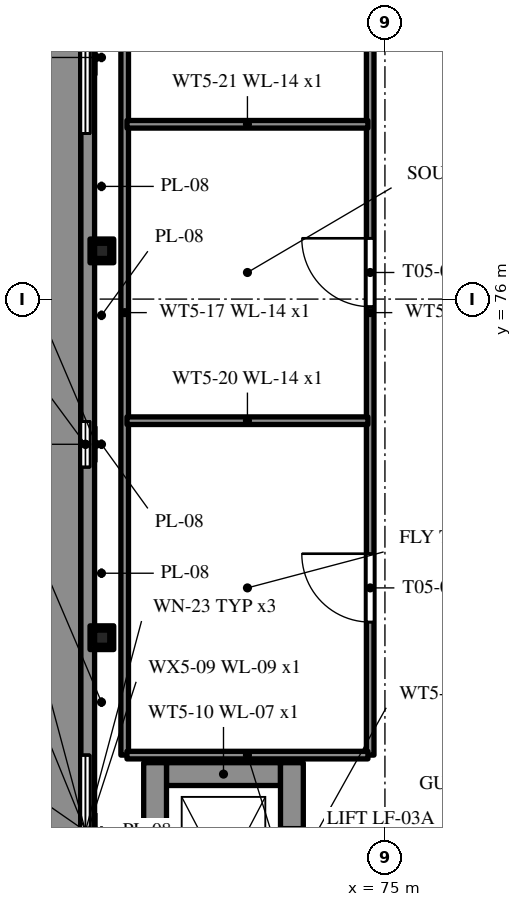
"""IFC4 building model, lengths in metres.
Left out: names, types, materials, properties, quantities, classifications, styles, units other than length and angle.
Written with IfcOpenShell. Run it as: python <this file> out.ifc"""

import sys

from ifc_helpers import new_model, si_unit, direction, frame, frame_2d, origin, origin_2d, place, context, subcontext, project, spatial, polyline, rectangle, hollow_rectangle, i_section, outline, extrude, element, fill, save


model = new_model("IFC4")
c1 = context("Model", 3, precision=1e-05, world=origin(), true_north=direction((0.0, 1.0)))
c2 = subcontext(c1, "Body", "Model", "MODEL_VIEW")
j1 = project(units=[si_unit("LENGTHUNIT", "METRE"), si_unit("PLANEANGLEUNIT", "RADIAN")], contexts=[c1])
p1 = place(None, origin())
s1 = spatial("IfcSite", under=j1, at=p1, CompositionType="ELEMENT")
p2 = place(p1, origin())
s2 = spatial("IfcBuilding", under=s1, at=p2, CompositionType="ELEMENT")
p3 = place(p2, frame((0.0, 0.0, 24.0)))
s3 = spatial("IfcBuildingStorey", under=s2, at=p3, CompositionType="ELEMENT", Elevation=24.0)
p4 = place(p3, frame((70.775, 55.4, 0.0), z_axis=(0.0, 0.0, 1.0), x_axis=(0.0, 1.0, 0.0)))
e1 = element("IfcWall", 1, at=p4, inside=s3, PredefinedType="SOLIDWALL", context=c2, shape_type="SweptSolid", body=[
    extrude(outline(polyline([(0.0, 0.0), (27.05, 0.0), (27.05, 0.5), (25.75, 0.5), (25.664, 0.5), (25.578, 0.5), (22.978, 0.5), (22.899, 0.5), (20.704, 0.5), (20.509, 0.5), (18.742, 0.5), (18.677, 0.5), (17.018, 0.5), (16.956, 0.5), (16.894, 0.5), (13.935, 0.5), (13.871, 0.5), (13.807, 0.5), (11.958, 0.5), (11.896, 0.5), (10.181, 0.5), (10.025, 0.5), (8.455, 0.5), (8.397, 0.5), (6.845, 0.5), (6.789, 0.5), (6.732, 0.5), (3.004, 0.5), (2.947, 0.5), (2.89, 0.5), (1.288, 0.5), (1.232, 0.5), (0.0, 0.5), (0.0, 0.0)])), frame((0.0, 0.225, 0.0), z_axis=(0.0, -1.0, 0.0), x_axis=(1.0, 0.0, 0.0)), (0.0, 0.0, 1.0), 0.45),
])
for number, where, z_axis, x_axis in (
    (2, (71.276, 71.545, 0.0), (0.0, 0.0, 1.0), (1.0, 0.0, 0.0)),
    (3, (71.276, 76.635, 0.0), (0.0, 0.0, 1.0), (1.0, 0.0, 0.0)),
):
    element("IfcColumn", number, at=place(p3, frame(where, z_axis=z_axis, x_axis=x_axis)), inside=s3, PredefinedType="COLUMN", context=c2, shape_type="SweptSolid", body=[
        extrude(i_section(OverallWidth=0.312, OverallDepth=0.312, WebThickness=0.017, FlangeThickness=0.017, FilletRadius=0.016, at=origin_2d()), origin(), (0.0, 0.0, 1.0), 12.21),
    ])
p5 = place(p3, frame((73.626, 69.75, 0.0), z_axis=(0.0, 0.0, 1.0), x_axis=(-1.0, 0.0, 0.0)))
e4 = element("IfcWall", 4, at=p5, inside=s3, PredefinedType="SHEAR", context=c2, shape_type="SweptSolid", body=[
    extrude(rectangle(XDim=1.5, YDim=0.3, at=frame_2d((0.75, 0.0))), origin(), (0.0, 0.0, 1.0), 4.2),
])
p6 = place(p3, frame((71.976, 66.9, 0.0), z_axis=(0.0, 0.0, 1.0), x_axis=(0.0, 1.0, 0.0)))
e5 = element("IfcWall", 5, at=p6, inside=s3, PredefinedType="SHEAR", context=c2, shape_type="SweptSolid", body=[
    extrude(rectangle(XDim=3.0, YDim=0.3, at=frame_2d((1.5, 0.0))), origin(), (0.0, 0.0, 1.0), 4.2),
])
p7 = place(p3, frame((73.776, 66.9, 0.0), z_axis=(0.0, 0.0, 1.0), x_axis=(0.0, 1.0, 0.0)))
e6 = element("IfcWall", 6, at=p7, inside=s3, PredefinedType="SHEAR", context=c2, shape_type="SweptSolid", body=[
    extrude(rectangle(XDim=3.0, YDim=0.3, at=frame_2d((1.5, 0.0))), origin(), (0.0, 0.0, 1.0), 4.2),
])
p8 = place(p7, frame((0.85, 0.0, 0.0)))
e7 = element("IfcOpeningElement", 7, at=p8, cuts=e6, PredefinedType="OPENING", context=c2, shape_type="SweptSolid", body=[
    extrude(rectangle(XDim=1.3, YDim=2.3, at=frame_2d((0.65, 1.15))), frame((0.0, 0.16, 0.0), z_axis=(0.0, -1.0, 0.0), x_axis=(1.0, 0.0, 0.0)), (0.0, 0.0, 1.0), 0.32),
])
p9 = place(p3, frame((71.576, 70.0, 0.0), z_axis=(0.0, 0.0, 1.0), x_axis=(0.0, 1.0, 0.0)))
e8 = element("IfcWall", 8, at=p9, inside=s3, PredefinedType="PARTITIONING", context=c2, shape_type="SweptSolid", body=[
    extrude(rectangle(XDim=11.644, YDim=0.1, at=frame_2d((5.822, 0.0))), origin(), (0.0, 0.0, 1.0), 3.2),
])
p10 = place(p3, frame((74.806, 70.0, 0.0), z_axis=(0.0, 0.0, 1.0), x_axis=(0.0, 1.0, 0.0)))
e9 = element("IfcWall", 9, at=p10, inside=s3, PredefinedType="PARTITIONING", context=c2, shape_type="SweptSolid", body=[
    extrude(rectangle(XDim=11.644, YDim=0.1, at=frame_2d((5.822, 0.0))), origin(), (0.0, 0.0, 1.0), 3.2),
])
p11 = place(p10, frame((1.75, 0.0, 0.0)))
e10 = element("IfcOpeningElement", 10, at=p11, cuts=e9, PredefinedType="OPENING", context=c2, shape_type="SweptSolid", body=[
    extrude(rectangle(XDim=0.9, YDim=2.1, at=frame_2d((0.45, 1.05))), frame((0.0, 0.06, 0.0), z_axis=(0.0, -1.0, 0.0), x_axis=(1.0, 0.0, 0.0)), (0.0, 0.0, 1.0), 0.12),
])
p12 = place(p10, frame((5.9, 0.0, 0.0)))
e11 = element("IfcOpeningElement", 11, at=p12, cuts=e9, PredefinedType="OPENING", context=c2, shape_type="SweptSolid", body=[
    extrude(rectangle(XDim=0.9, YDim=2.1, at=frame_2d((0.45, 1.05))), frame((0.0, 0.06, 0.0), z_axis=(0.0, -1.0, 0.0), x_axis=(1.0, 0.0, 0.0)), (0.0, 0.0, 1.0), 0.12),
])
p13 = place(p10, frame((9.522, 0.0, 0.0)))
e12 = element("IfcOpeningElement", 12, at=p13, cuts=e9, PredefinedType="OPENING", context=c2, shape_type="SweptSolid", body=[
    extrude(rectangle(XDim=0.9, YDim=2.1, at=frame_2d((0.45, 1.05))), frame((0.0, 0.06, 0.0), z_axis=(0.0, -1.0, 0.0), x_axis=(1.0, 0.0, 0.0)), (0.0, 0.0, 1.0), 0.12),
])
for number, where, z_axis, x_axis in (
    (13, (71.606, 70.0, 0.0), (0.0, 0.0, 1.0), (1.0, 0.0, 0.0)),
    (14, (71.606, 74.4, 0.0), (0.0, 0.0, 1.0), (1.0, 0.0, 0.0)),
    (15, (71.606, 78.3, 0.0), (0.0, 0.0, 1.0), (1.0, 0.0, 0.0)),
):
    element("IfcWall", number, at=place(p3, frame(where, z_axis=z_axis, x_axis=x_axis)), inside=s3, PredefinedType="PARTITIONING", context=c2, shape_type="SweptSolid", body=[
        extrude(rectangle(XDim=3.17, YDim=0.1, at=frame_2d((1.585, 0.0))), origin(), (0.0, 0.0, 1.0), 3.2),
    ])
p14 = place(p3, frame((71.06, 56.12, 0.0), z_axis=(0.0, 0.0, 1.0), x_axis=(0.0, 1.0, 0.0)))
e16 = element("IfcWall", 16, at=p14, inside=s3, PredefinedType="STANDARD", context=c2, shape_type="SweptSolid", body=[
    extrude(rectangle(XDim=25.76, YDim=0.12, at=frame_2d((12.88, 0.0))), origin(), (0.0, 0.0, 1.0), 4.0),
])
p15 = place(p14, frame((1.701, 0.0, 1.4)))
e17 = element("IfcOpeningElement", 17, at=p15, cuts=e16, PredefinedType="OPENING", context=c2, shape_type="SweptSolid", body=[
    extrude(rectangle(XDim=2.0, YDim=1.2, at=frame_2d((1.0, 0.6))), frame((0.0, 0.07, 0.0), z_axis=(0.0, -1.0, 0.0), x_axis=(1.0, 0.0, 0.0)), (0.0, 0.0, 1.0), 0.14),
])
p16 = place(p14, frame((11.88, 0.0, 1.4)))
e18 = element("IfcOpeningElement", 18, at=p16, cuts=e16, PredefinedType="OPENING", context=c2, shape_type="SweptSolid", body=[
    extrude(rectangle(XDim=2.0, YDim=1.2, at=frame_2d((1.0, 0.6))), frame((0.0, 0.07, 0.0), z_axis=(0.0, -1.0, 0.0), x_axis=(1.0, 0.0, 0.0)), (0.0, 0.0, 1.0), 0.14),
])
p17 = place(p14, frame((22.059, 0.0, 1.4)))
e19 = element("IfcOpeningElement", 19, at=p17, cuts=e16, PredefinedType="OPENING", context=c2, shape_type="SweptSolid", body=[
    extrude(rectangle(XDim=2.0, YDim=1.2, at=frame_2d((1.0, 0.6))), frame((0.0, 0.07, 0.0), z_axis=(0.0, -1.0, 0.0), x_axis=(1.0, 0.0, 0.0)), (0.0, 0.0, 1.0), 0.14),
])
p18 = place(p14, frame((7.49, 0.0, 0.5)))
e20 = element("IfcOpeningElement", 20, at=p18, cuts=e16, PredefinedType="OPENING", context=c2, shape_type="SweptSolid", body=[
    extrude(rectangle(XDim=0.6, YDim=2.1, at=frame_2d((0.3, 1.05))), frame((0.0, 0.07, 0.0), z_axis=(0.0, -1.0, 0.0), x_axis=(1.0, 0.0, 0.0)), (0.0, 0.0, 1.0), 0.14),
])
p19 = place(p14, frame((17.67, 0.0, 0.5)))
e21 = element("IfcOpeningElement", 21, at=p19, cuts=e16, PredefinedType="OPENING", context=c2, shape_type="SweptSolid", body=[
    extrude(rectangle(XDim=0.6, YDim=2.1, at=frame_2d((0.3, 1.05))), frame((0.0, 0.07, 0.0), z_axis=(0.0, -1.0, 0.0), x_axis=(1.0, 0.0, 0.0)), (0.0, 0.0, 1.0), 0.14),
])
p20 = place(p3, frame((71.06, 56.12, 4.0), z_axis=(0.0, 0.0, 1.0), x_axis=(0.0, 1.0, 0.0)))
e22 = element("IfcWall", 22, at=p20, inside=s3, PredefinedType="STANDARD", context=c2, shape_type="SweptSolid", body=[
    extrude(rectangle(XDim=25.76, YDim=0.12, at=frame_2d((12.88, 0.0))), origin(), (0.0, 0.0, 1.0), 8.5),
])
p21 = place(p20, frame((1.701, 0.0, 2.4)))
e23 = element("IfcOpeningElement", 23, at=p21, cuts=e22, PredefinedType="OPENING", context=c2, shape_type="SweptSolid", body=[
    extrude(rectangle(XDim=2.0, YDim=1.2, at=frame_2d((1.0, 0.6))), frame((0.0, 0.07, 0.0), z_axis=(0.0, -1.0, 0.0), x_axis=(1.0, 0.0, 0.0)), (0.0, 0.0, 1.0), 0.14),
])
p22 = place(p20, frame((1.701, 0.0, 5.6)))
e24 = element("IfcOpeningElement", 24, at=p22, cuts=e22, PredefinedType="OPENING", context=c2, shape_type="SweptSolid", body=[
    extrude(rectangle(XDim=2.0, YDim=1.2, at=frame_2d((1.0, 0.6))), frame((0.0, 0.07, 0.0), z_axis=(0.0, -1.0, 0.0), x_axis=(1.0, 0.0, 0.0)), (0.0, 0.0, 1.0), 0.14),
])
p23 = place(p20, frame((11.88, 0.0, 2.4)))
e25 = element("IfcOpeningElement", 25, at=p23, cuts=e22, PredefinedType="OPENING", context=c2, shape_type="SweptSolid", body=[
    extrude(rectangle(XDim=2.0, YDim=1.2, at=frame_2d((1.0, 0.6))), frame((0.0, 0.07, 0.0), z_axis=(0.0, -1.0, 0.0), x_axis=(1.0, 0.0, 0.0)), (0.0, 0.0, 1.0), 0.14),
])
p24 = place(p20, frame((11.88, 0.0, 5.6)))
e26 = element("IfcOpeningElement", 26, at=p24, cuts=e22, PredefinedType="OPENING", context=c2, shape_type="SweptSolid", body=[
    extrude(rectangle(XDim=2.0, YDim=1.2, at=frame_2d((1.0, 0.6))), frame((0.0, 0.07, 0.0), z_axis=(0.0, -1.0, 0.0), x_axis=(1.0, 0.0, 0.0)), (0.0, 0.0, 1.0), 0.14),
])
p25 = place(p20, frame((22.059, 0.0, 2.4)))
e27 = element("IfcOpeningElement", 27, at=p25, cuts=e22, PredefinedType="OPENING", context=c2, shape_type="SweptSolid", body=[
    extrude(rectangle(XDim=2.0, YDim=1.2, at=frame_2d((1.0, 0.6))), frame((0.0, 0.07, 0.0), z_axis=(0.0, -1.0, 0.0), x_axis=(1.0, 0.0, 0.0)), (0.0, 0.0, 1.0), 0.14),
])
p26 = place(p20, frame((22.059, 0.0, 5.6)))
e28 = element("IfcOpeningElement", 28, at=p26, cuts=e22, PredefinedType="OPENING", context=c2, shape_type="SweptSolid", body=[
    extrude(rectangle(XDim=2.0, YDim=1.2, at=frame_2d((1.0, 0.6))), frame((0.0, 0.07, 0.0), z_axis=(0.0, -1.0, 0.0), x_axis=(1.0, 0.0, 0.0)), (0.0, 0.0, 1.0), 0.14),
])
p27 = place(p20, frame((7.49, 0.0, 1.5)))
e29 = element("IfcOpeningElement", 29, at=p27, cuts=e22, PredefinedType="OPENING", context=c2, shape_type="SweptSolid", body=[
    extrude(rectangle(XDim=0.6, YDim=2.1, at=frame_2d((0.3, 1.05))), frame((0.0, 0.07, 0.0), z_axis=(0.0, -1.0, 0.0), x_axis=(1.0, 0.0, 0.0)), (0.0, 0.0, 1.0), 0.14),
])
p28 = place(p20, frame((17.67, 0.0, 1.5)))
e30 = element("IfcOpeningElement", 30, at=p28, cuts=e22, PredefinedType="OPENING", context=c2, shape_type="SweptSolid", body=[
    extrude(rectangle(XDim=0.6, YDim=2.1, at=frame_2d((0.3, 1.05))), frame((0.0, 0.07, 0.0), z_axis=(0.0, -1.0, 0.0), x_axis=(1.0, 0.0, 0.0)), (0.0, 0.0, 1.0), 0.14),
])
p29 = place(p3, frame((71.09, 56.0, 12.5), z_axis=(0.0, 0.0, 1.0), x_axis=(0.0, 1.0, 0.0)))
e31 = element("IfcWall", 31, at=p29, inside=s3, PredefinedType="PARAPET", context=c2, shape_type="SweptSolid", body=[
    extrude(rectangle(XDim=26.0, YDim=0.18, at=frame_2d((13.0, 0.0))), origin(), (0.0, 0.0, 1.0), 1.1),
])
for number, where, z_axis, x_axis in (
    (32, (71.28, 71.545, 12.21), (0.0, 0.0, 1.0), (1.0, 0.0, 0.0)),
    (33, (71.28, 76.635, 12.21), (0.0, 0.0, 1.0), (1.0, 0.0, 0.0)),
):
    element("IfcColumn", number, at=place(p3, frame(where, z_axis=z_axis, x_axis=x_axis)), inside=s3, PredefinedType="COLUMN", context=c2, shape_type="SweptSolid", body=[
        extrude(hollow_rectangle(XDim=0.2, YDim=0.2, WallThickness=0.01, InnerFilletRadius=0.01, OuterFilletRadius=0.02, at=origin_2d()), origin(), (0.0, 0.0, 1.0), 1.39),
    ])
p30 = place(p11, origin())
e34 = element("IfcDoor", 34, at=p30, inside=s3, OperationType="SINGLE_SWING_RIGHT", PredefinedType="DOOR", context=c2, shape_type="SweptSolid", body=[
    extrude(rectangle(XDim=0.9, YDim=2.1, at=frame_2d((0.45, 1.05))), frame((0.0, 0.025, 0.0), z_axis=(0.0, -1.0, 0.0), x_axis=(1.0, 0.0, 0.0)), (0.0, 0.0, 1.0), 0.05),
])
fill(e10, e34)
p31 = place(p12, origin())
e35 = element("IfcDoor", 35, at=p31, inside=s3, OperationType="SINGLE_SWING_RIGHT", PredefinedType="DOOR", context=c2, shape_type="SweptSolid", body=[
    extrude(rectangle(XDim=0.9, YDim=2.1, at=frame_2d((0.45, 1.05))), frame((0.0, 0.025, 0.0), z_axis=(0.0, -1.0, 0.0), x_axis=(1.0, 0.0, 0.0)), (0.0, 0.0, 1.0), 0.05),
])
fill(e11, e35)
p32 = place(p16, origin())
e36 = element("IfcWindow", 36, at=p32, inside=s3, PartitioningType="SINGLE_PANEL", PredefinedType="WINDOW", context=c2, shape_type="SweptSolid", body=[
    extrude(rectangle(XDim=2.0, YDim=1.2, at=frame_2d((1.0, 0.6))), frame((0.0, 0.03, 0.0), z_axis=(0.0, -1.0, 0.0), x_axis=(1.0, 0.0, 0.0)), (0.0, 0.0, 1.0), 0.06),
])
fill(e18, e36)
p33 = place(p23, origin())
e37 = element("IfcWindow", 37, at=p33, inside=s3, PartitioningType="SINGLE_PANEL", PredefinedType="WINDOW", context=c2, shape_type="SweptSolid", body=[
    extrude(rectangle(XDim=2.0, YDim=1.2, at=frame_2d((1.0, 0.6))), frame((0.0, 0.03, 0.0), z_axis=(0.0, -1.0, 0.0), x_axis=(1.0, 0.0, 0.0)), (0.0, 0.0, 1.0), 0.06),
])
fill(e25, e37)
p34 = place(p24, origin())
e38 = element("IfcWindow", 38, at=p34, inside=s3, PartitioningType="SINGLE_PANEL", PredefinedType="WINDOW", context=c2, shape_type="SweptSolid", body=[
    extrude(rectangle(XDim=2.0, YDim=1.2, at=frame_2d((1.0, 0.6))), frame((0.0, 0.03, 0.0), z_axis=(0.0, -1.0, 0.0), x_axis=(1.0, 0.0, 0.0)), (0.0, 0.0, 1.0), 0.06),
])
fill(e26, e38)
p35 = place(p17, origin())
e39 = element("IfcWindow", 39, at=p35, inside=s3, PartitioningType="SINGLE_PANEL", PredefinedType="WINDOW", context=c2, shape_type="SweptSolid", body=[
    extrude(rectangle(XDim=2.0, YDim=1.2, at=frame_2d((1.0, 0.6))), frame((0.0, 0.03, 0.0), z_axis=(0.0, -1.0, 0.0), x_axis=(1.0, 0.0, 0.0)), (0.0, 0.0, 1.0), 0.06),
])
fill(e19, e39)
p36 = place(p25, origin())
e40 = element("IfcWindow", 40, at=p36, inside=s3, PartitioningType="SINGLE_PANEL", PredefinedType="WINDOW", context=c2, shape_type="SweptSolid", body=[
    extrude(rectangle(XDim=2.0, YDim=1.2, at=frame_2d((1.0, 0.6))), frame((0.0, 0.03, 0.0), z_axis=(0.0, -1.0, 0.0), x_axis=(1.0, 0.0, 0.0)), (0.0, 0.0, 1.0), 0.06),
])
fill(e27, e40)
p37 = place(p26, origin())
e41 = element("IfcWindow", 41, at=p37, inside=s3, PartitioningType="SINGLE_PANEL", PredefinedType="WINDOW", context=c2, shape_type="SweptSolid", body=[
    extrude(rectangle(XDim=2.0, YDim=1.2, at=frame_2d((1.0, 0.6))), frame((0.0, 0.03, 0.0), z_axis=(0.0, -1.0, 0.0), x_axis=(1.0, 0.0, 0.0)), (0.0, 0.0, 1.0), 0.06),
])
fill(e28, e41)
p38 = place(p19, origin())
e42 = element("IfcWindow", 42, at=p38, inside=s3, PartitioningType="SINGLE_PANEL", PredefinedType="WINDOW", context=c2, shape_type="SweptSolid", body=[
    extrude(rectangle(XDim=0.6, YDim=2.1, at=frame_2d((0.3, 1.05))), frame((0.0, 0.03, 0.0), z_axis=(0.0, -1.0, 0.0), x_axis=(1.0, 0.0, 0.0)), (0.0, 0.0, 1.0), 0.06),
])
fill(e21, e42)
p39 = place(p28, origin())
e43 = element("IfcWindow", 43, at=p39, inside=s3, PartitioningType="SINGLE_PANEL", PredefinedType="WINDOW", context=c2, shape_type="SweptSolid", body=[
    extrude(rectangle(XDim=0.6, YDim=2.1, at=frame_2d((0.3, 1.05))), frame((0.0, 0.03, 0.0), z_axis=(0.0, -1.0, 0.0), x_axis=(1.0, 0.0, 0.0)), (0.0, 0.0, 1.0), 0.06),
])
fill(e30, e43)
save(model, sys.argv[1])
